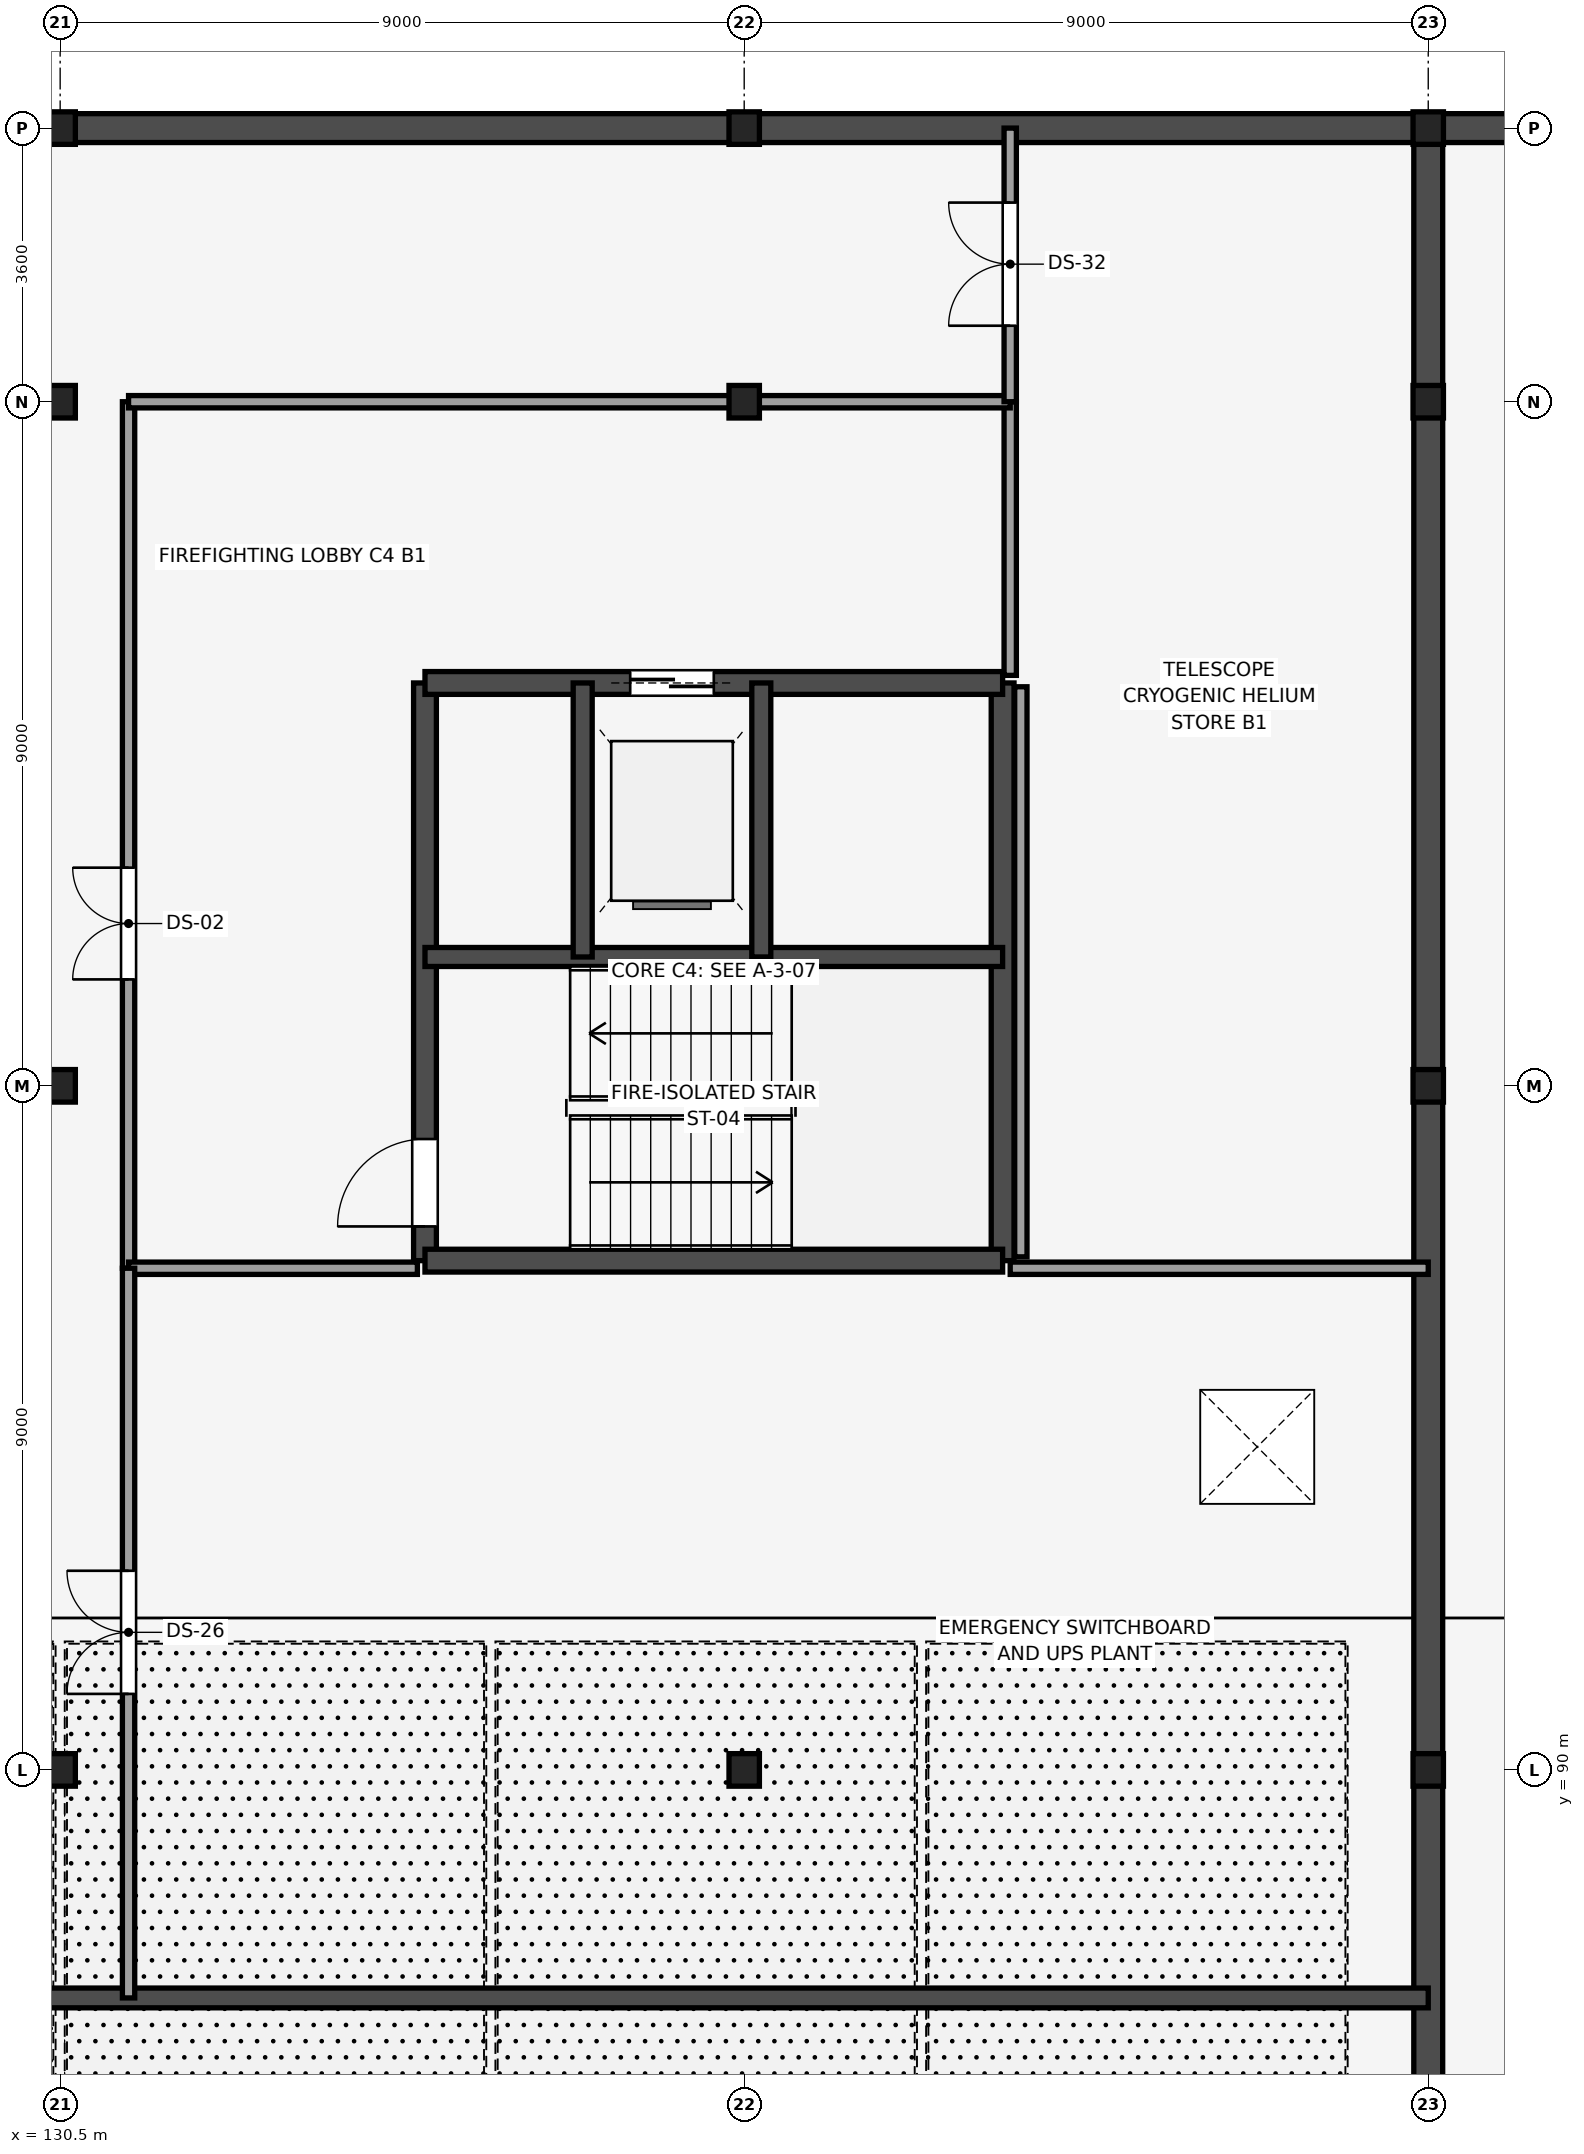
"""IFC4 building model, lengths in metres.
Left out: names, types, materials, properties, quantities, classifications, styles, units other than length and angle.
Written with IfcOpenShell. Run it as: python <this file> out.ifc"""

import sys

from ifc_helpers import new_model, si_unit, direction, frame, frame_2d, origin, origin_2d, place, context, subcontext, project, spatial, rectangle, i_section, extrude, element, fill, save


model = new_model("IFC4")
c1 = context("Model", 3, precision=1e-05, world=origin(), true_north=direction((0.0, 1.0)))
c2 = subcontext(c1, "Body", "Model", "MODEL_VIEW")
j1 = project(units=[si_unit("LENGTHUNIT", "METRE"), si_unit("PLANEANGLEUNIT", "RADIAN")], contexts=[c1])
p1 = place(None, origin())
s1 = spatial("IfcSite", under=j1, at=p1, CompositionType="ELEMENT")
p2 = place(p1, origin())
s2 = spatial("IfcBuilding", under=s1, at=p2, CompositionType="ELEMENT")
p3 = place(p2, frame((0.0, 0.0, -4.5)))
s3 = spatial("IfcBuildingStorey", under=s2, at=p3, CompositionType="ELEMENT", Elevation=-4.5)
for number, where, z_axis, x_axis in (
    (1, (130.5, 90.0, 0.0), (0.0, 0.0, 1.0), (1.0, 0.0, 0.0)),
    (2, (130.5, 99.0, 0.0), (0.0, 0.0, 1.0), (1.0, 0.0, 0.0)),
    (3, (130.5, 108.0, 0.0), (0.0, 0.0, 1.0), (1.0, 0.0, 0.0)),
    (4, (130.5, 111.6, 0.0), (0.0, 0.0, 1.0), (1.0, 0.0, 0.0)),
    (5, (139.5, 90.0, 0.0), (0.0, 0.0, 1.0), (1.0, 0.0, 0.0)),
    (6, (139.5, 108.0, 0.0), (0.0, 0.0, 1.0), (1.0, 0.0, 0.0)),
    (7, (139.5, 111.6, 0.0), (0.0, 0.0, 1.0), (1.0, 0.0, 0.0)),
    (8, (148.5, 90.0, 0.0), (0.0, 0.0, 1.0), (1.0, 0.0, 0.0)),
    (9, (148.5, 99.0, 0.0), (0.0, 0.0, 1.0), (1.0, 0.0, 0.0)),
    (10, (148.5, 108.0, 0.0), (0.0, 0.0, 1.0), (1.0, 0.0, 0.0)),
    (11, (148.5, 111.6, 0.0), (0.0, 0.0, 1.0), (1.0, 0.0, 0.0)),
):
    element("IfcColumn", number, at=place(p3, frame(where, z_axis=z_axis, x_axis=x_axis)), inside=s3, PredefinedType="COLUMN", context=c2, shape_type="SweptSolid", body=[
        extrude(i_section(OverallWidth=0.4, OverallDepth=0.428, WebThickness=0.02, FlangeThickness=0.028, FilletRadius=0.016, at=origin_2d()), origin(), (0.0, 0.0, 1.0), 4.5),
    ])
p4 = place(p3, frame((135.3, 96.7, 0.0), z_axis=(0.0, 0.0, 1.0), x_axis=(0.0, 1.0, 0.0)))
e12 = element("IfcWall", 12, at=p4, inside=s3, PredefinedType="SHEAR", context=c2, shape_type="SweptSolid", body=[
    extrude(rectangle(XDim=7.6, YDim=0.3, at=frame_2d((3.8, 0.0))), origin(), (0.0, 0.0, 1.0), 4.5),
])
p5 = place(p4, frame((0.45, 0.0, 0.0)))
e13 = element("IfcOpeningElement", 13, at=p5, cuts=e12, PredefinedType="OPENING", context=c2, shape_type="SweptSolid", body=[
    extrude(rectangle(XDim=1.15, YDim=2.15, at=frame_2d((0.575, 1.075))), frame((0.0, 0.16, 0.0), z_axis=(0.0, -1.0, 0.0), x_axis=(1.0, 0.0, 0.0)), (0.0, 0.0, 1.0), 0.32),
])
p6 = place(p3, frame((142.9, 96.7, 0.0), z_axis=(0.0, 0.0, 1.0), x_axis=(0.0, 1.0, 0.0)))
e14 = element("IfcWall", 14, at=p6, inside=s3, PredefinedType="SHEAR", context=c2, shape_type="SweptSolid", body=[
    extrude(rectangle(XDim=7.6, YDim=0.3, at=frame_2d((3.8, 0.0))), origin(), (0.0, 0.0, 1.0), 4.5),
])
p7 = place(p3, frame((135.3, 96.7, 0.0), z_axis=(0.0, 0.0, 1.0), x_axis=(1.0, 0.0, 0.0)))
e15 = element("IfcWall", 15, at=p7, inside=s3, PredefinedType="SHEAR", context=c2, shape_type="SweptSolid", body=[
    extrude(rectangle(XDim=7.6, YDim=0.3, at=frame_2d((3.8, 0.0))), origin(), (0.0, 0.0, 1.0), 4.5),
])
p8 = place(p3, frame((135.3, 104.3, 0.0), z_axis=(0.0, 0.0, 1.0), x_axis=(1.0, 0.0, 0.0)))
e16 = element("IfcWall", 16, at=p8, inside=s3, PredefinedType="SHEAR", context=c2, shape_type="SweptSolid", body=[
    extrude(rectangle(XDim=7.6, YDim=0.3, at=frame_2d((3.8, 0.0))), origin(), (0.0, 0.0, 1.0), 4.5),
])
p9 = place(p8, frame((2.7, 0.0, 0.0)))
e17 = element("IfcOpeningElement", 17, at=p9, cuts=e16, PredefinedType="OPENING", context=c2, shape_type="SweptSolid", body=[
    extrude(rectangle(XDim=1.1, YDim=2.2, at=frame_2d((0.55, 1.1))), frame((0.0, 0.16, 0.0), z_axis=(0.0, -1.0, 0.0), x_axis=(1.0, 0.0, 0.0)), (0.0, 0.0, 1.0), 0.32),
])
p10 = place(p3, frame((135.3, 100.695, 0.0), z_axis=(0.0, 0.0, 1.0), x_axis=(1.0, 0.0, 0.0)))
e18 = element("IfcWall", 18, at=p10, inside=s3, PredefinedType="SHEAR", context=c2, shape_type="SweptSolid", body=[
    extrude(rectangle(XDim=7.6, YDim=0.25, at=frame_2d((3.8, 0.0))), origin(), (0.0, 0.0, 1.0), 4.5),
])
for number, where, z_axis, x_axis in (
    (19, (137.375, 100.695, 0.0), (0.0, 0.0, 1.0), (0.0, 1.0, 0.0)),
    (20, (139.725, 100.695, 0.0), (0.0, 0.0, 1.0), (0.0, 1.0, 0.0)),
):
    element("IfcWall", number, at=place(p3, frame(where, z_axis=z_axis, x_axis=x_axis)), inside=s3, PredefinedType="SHEAR", context=c2, shape_type="SweptSolid", body=[
        extrude(rectangle(XDim=3.605, YDim=0.25, at=frame_2d((1.802, 0.0))), origin(), (0.0, 0.0, 1.0), 4.5),
    ])
p11 = place(p3, frame((148.5, 111.6, 0.0), z_axis=(0.0, 0.0, 1.0), x_axis=(1.0, 0.0, 0.0)))
e21 = element("IfcWall", 21, at=p11, inside=s3, PredefinedType="SHEAR", context=c2, shape_type="SweptSolid", body=[
    extrude(rectangle(XDim=13.5, YDim=0.38, at=frame_2d((6.75, 0.0))), origin(), (0.0, 0.0, 1.0), 4.26),
])
p12 = place(p3, frame((112.525, 111.6, 0.0), z_axis=(0.0, 0.0, 1.0), x_axis=(1.0, 0.0, 0.0)))
e22 = element("IfcWall", 22, at=p12, inside=s3, PredefinedType="SHEAR", context=c2, shape_type="SweptSolid", body=[
    extrude(rectangle(XDim=35.975, YDim=0.38, at=frame_2d((17.988, 0.0))), origin(), (0.0, 0.0, 1.0), 4.26),
])
p13 = place(p3, frame((148.5, 72.0, 0.0), z_axis=(0.0, 0.0, 1.0), x_axis=(0.0, 1.0, 0.0)))
e23 = element("IfcWall", 23, at=p13, inside=s3, PredefinedType="SHEAR", context=c2, shape_type="SweptSolid", body=[
    extrude(rectangle(XDim=39.6, YDim=0.38, at=frame_2d((19.8, 0.0))), origin(), (0.0, 0.0, 1.0), 4.26),
])
p14 = place(p3, frame((124.6, 87.0, 0.0), z_axis=(0.0, 0.0, 1.0), x_axis=(1.0, 0.0, 0.0)))
e24 = element("IfcWall", 24, at=p14, inside=s3, PredefinedType="SHEAR", context=c2, shape_type="SweptSolid", body=[
    extrude(rectangle(XDim=23.9, YDim=0.26, at=frame_2d((11.95, 0.0))), origin(), (0.0, 0.0, 1.0), 4.26),
])
p15 = place(p14, frame((3.2, 0.0, 0.0)))
e25 = element("IfcOpeningElement", 25, at=p15, cuts=e24, PredefinedType="OPENING", context=c2, shape_type="SweptSolid", body=[
    extrude(rectangle(XDim=1.6, YDim=2.2, at=frame_2d((0.8, 1.1))), frame((0.0, 0.14, 0.0), z_axis=(0.0, -1.0, 0.0), x_axis=(1.0, 0.0, 0.0)), (0.0, 0.0, 1.0), 0.28),
])
p16 = place(p3, frame((131.4, 96.6, 0.0), z_axis=(0.0, 0.0, 1.0), x_axis=(0.0, 1.0, 0.0)))
e26 = element("IfcWall", 26, at=p16, inside=s3, PredefinedType="PARTITIONING", context=c2, shape_type="SweptSolid", body=[
    extrude(rectangle(XDim=11.4, YDim=0.162, at=frame_2d((5.7, 0.0))), origin(), (0.0, 0.0, 1.0), 4.26),
])
p17 = place(p16, frame((3.8, 0.0, 0.0)))
e27 = element("IfcOpeningElement", 27, at=p17, cuts=e26, PredefinedType="OPENING", context=c2, shape_type="SweptSolid", body=[
    extrude(rectangle(XDim=1.47, YDim=2.15, at=frame_2d((0.735, 1.075))), frame((0.0, 0.091, 0.0), z_axis=(0.0, -1.0, 0.0), x_axis=(1.0, 0.0, 0.0)), (0.0, 0.0, 1.0), 0.182),
])
p18 = place(p3, frame((131.4, 96.6, 0.0), z_axis=(0.0, 0.0, 1.0), x_axis=(1.0, 0.0, 0.0)))
e28 = element("IfcWall", 28, at=p18, inside=s3, PredefinedType="PARTITIONING", context=c2, shape_type="SweptSolid", body=[
    extrude(rectangle(XDim=3.8, YDim=0.162, at=frame_2d((1.9, 0.0))), origin(), (0.0, 0.0, 1.0), 4.26),
])
p19 = place(p3, frame((143.0, 104.4, 0.0), z_axis=(0.0, 0.0, 1.0), x_axis=(0.0, 1.0, 0.0)))
e29 = element("IfcWall", 29, at=p19, inside=s3, PredefinedType="PARTITIONING", context=c2, shape_type="SweptSolid", body=[
    extrude(rectangle(XDim=3.6, YDim=0.162, at=frame_2d((1.8, 0.0))), origin(), (0.0, 0.0, 1.0), 4.26),
])
p20 = place(p3, frame((131.4, 108.0, 0.0), z_axis=(0.0, 0.0, 1.0), x_axis=(1.0, 0.0, 0.0)))
e30 = element("IfcWall", 30, at=p20, inside=s3, PredefinedType="PARTITIONING", context=c2, shape_type="SweptSolid", body=[
    extrude(rectangle(XDim=11.6, YDim=0.162, at=frame_2d((5.8, 0.0))), origin(), (0.0, 0.0, 1.0), 3.786),
])
p21 = place(p3, frame((131.4, 87.0, 0.0), z_axis=(0.0, 0.0, 1.0), x_axis=(0.0, 1.0, 0.0)))
e31 = element("IfcWall", 31, at=p21, inside=s3, PredefinedType="PARTITIONING", context=c2, shape_type="SweptSolid", body=[
    extrude(rectangle(XDim=9.6, YDim=0.162, at=frame_2d((4.8, 0.0))), origin(), (0.0, 0.0, 1.0), 4.26),
])
p22 = place(p21, frame((4.0, 0.0, 0.0)))
e32 = element("IfcOpeningElement", 32, at=p22, cuts=e31, PredefinedType="OPENING", context=c2, shape_type="SweptSolid", body=[
    extrude(rectangle(XDim=1.62, YDim=2.25, at=frame_2d((0.81, 1.125))), frame((0.0, 0.091, 0.0), z_axis=(0.0, -1.0, 0.0), x_axis=(1.0, 0.0, 0.0)), (0.0, 0.0, 1.0), 0.182),
])
p23 = place(p3, frame((143.0, 96.6, 0.0), z_axis=(0.0, 0.0, 1.0), x_axis=(1.0, 0.0, 0.0)))
e33 = element("IfcWall", 33, at=p23, inside=s3, PredefinedType="PARTITIONING", context=c2, shape_type="SweptSolid", body=[
    extrude(rectangle(XDim=5.5, YDim=0.162, at=frame_2d((2.75, 0.0))), origin(), (0.0, 0.0, 1.0), 4.26),
])
p24 = place(p3, frame((143.0, 108.0, 0.0), z_axis=(0.0, 0.0, 1.0), x_axis=(0.0, 1.0, 0.0)))
e34 = element("IfcWall", 34, at=p24, inside=s3, PredefinedType="PARTITIONING", context=c2, shape_type="SweptSolid", body=[
    extrude(rectangle(XDim=3.6, YDim=0.162, at=frame_2d((1.8, 0.0))), origin(), (0.0, 0.0, 1.0), 4.26),
])
p25 = place(p24, frame((1.0, 0.0, 0.0)))
e35 = element("IfcOpeningElement", 35, at=p25, cuts=e34, PredefinedType="OPENING", context=c2, shape_type="SweptSolid", body=[
    extrude(rectangle(XDim=1.62, YDim=2.275, at=frame_2d((0.81, 1.137))), frame((0.0, 0.091, 0.0), z_axis=(0.0, -1.0, 0.0), x_axis=(1.0, 0.0, 0.0)), (0.0, 0.0, 1.0), 0.182),
])
p26 = place(p3, frame((143.14, 96.75, 0.0), z_axis=(0.0, 0.0, 1.0), x_axis=(0.0, 1.0, 0.0)))
e36 = element("IfcWall", 36, at=p26, inside=s3, PredefinedType="PARTITIONING", context=c2, shape_type="SweptSolid", body=[
    extrude(rectangle(XDim=7.5, YDim=0.162, at=frame_2d((3.75, 0.0))), origin(), (0.0, 0.0, 1.0), 4.26),
])
p27 = place(p5, origin())
e37 = element("IfcDoor", 37, at=p27, inside=s3, OperationType="SINGLE_SWING_LEFT", PredefinedType="DOOR", context=c2, shape_type="SweptSolid", body=[
    extrude(rectangle(XDim=1.15, YDim=2.15, at=frame_2d((0.575, 1.075))), frame((0.0, 0.025, 0.0), z_axis=(0.0, -1.0, 0.0), x_axis=(1.0, 0.0, 0.0)), (0.0, 0.0, 1.0), 0.05),
])
fill(e13, e37)
p28 = place(p9, origin())
e38 = element("IfcDoor", 38, at=p28, inside=s3, OperationType="DOUBLE_DOOR_SLIDING", PredefinedType="DOOR", context=c2, shape_type="SweptSolid", body=[
    extrude(rectangle(XDim=1.1, YDim=2.2, at=frame_2d((0.55, 1.1))), frame((0.0, 0.025, 0.0), z_axis=(0.0, -1.0, 0.0), x_axis=(1.0, 0.0, 0.0)), (0.0, 0.0, 1.0), 0.05),
])
fill(e17, e38)
p29 = place(p17, origin())
e39 = element("IfcDoor", 39, at=p29, inside=s3, OperationType="DOUBLE_DOOR_SINGLE_SWING", PredefinedType="DOOR", context=c2, shape_type="SweptSolid", body=[
    extrude(rectangle(XDim=1.47, YDim=2.15, at=frame_2d((0.735, 1.075))), frame((0.0, 0.025, 0.0), z_axis=(0.0, -1.0, 0.0), x_axis=(1.0, 0.0, 0.0)), (0.0, 0.0, 1.0), 0.05),
])
fill(e27, e39)
p30 = place(p22, origin())
e40 = element("IfcDoor", 40, at=p30, inside=s3, OperationType="DOUBLE_DOOR_SINGLE_SWING", PredefinedType="DOOR", context=c2, shape_type="SweptSolid", body=[
    extrude(rectangle(XDim=1.62, YDim=2.25, at=frame_2d((0.81, 1.125))), frame((0.0, 0.025, 0.0), z_axis=(0.0, -1.0, 0.0), x_axis=(1.0, 0.0, 0.0)), (0.0, 0.0, 1.0), 0.05),
])
fill(e32, e40)
p31 = place(p25, origin())
e41 = element("IfcDoor", 41, at=p31, inside=s3, OperationType="DOUBLE_DOOR_SINGLE_SWING", PredefinedType="DOOR", context=c2, shape_type="SweptSolid", body=[
    extrude(rectangle(XDim=1.62, YDim=2.275, at=frame_2d((0.81, 1.137))), frame((0.0, 0.025, 0.0), z_axis=(0.0, -1.0, 0.0), x_axis=(1.0, 0.0, 0.0)), (0.0, 0.0, 1.0), 0.05),
])
fill(e35, e41)
save(model, sys.argv[1])
